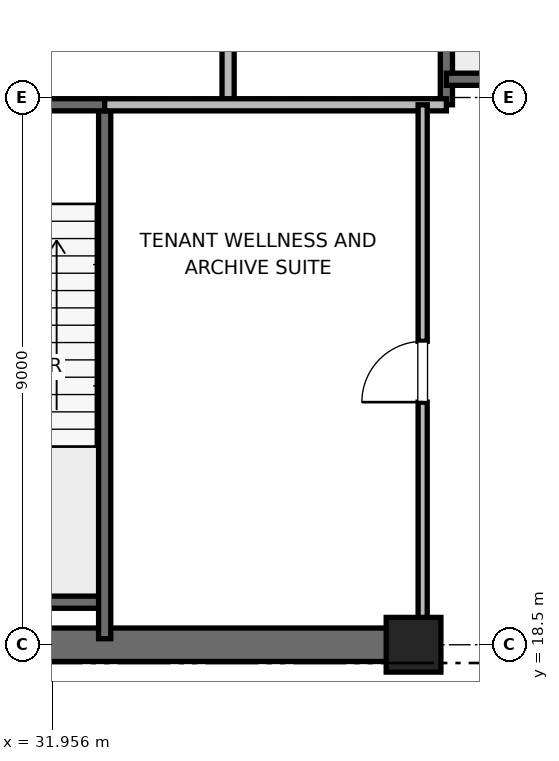
"""IFC4 building model, lengths in metres.
Left out: names, types, materials, properties, quantities, classifications, styles, units other than length and angle.
Written with IfcOpenShell. Run it as: python <this file> out.ifc"""

import sys

from ifc_helpers import new_model, si_unit, direction, frame, frame_2d, origin, origin_2d, place, context, subcontext, project, spatial, rectangle, extrude, element, fill, save


model = new_model("IFC4")
c1 = context("Model", 3, precision=1e-05, world=origin(), true_north=direction((0.0, 1.0)))
c2 = subcontext(c1, "Body", "Model", "MODEL_VIEW")
j1 = project(units=[si_unit("LENGTHUNIT", "METRE"), si_unit("PLANEANGLEUNIT", "RADIAN")], contexts=[c1])
p1 = place(None, origin())
s1 = spatial("IfcSite", under=j1, at=p1, CompositionType="ELEMENT")
p2 = place(p1, origin())
s2 = spatial("IfcBuilding", under=s1, at=p2, CompositionType="ELEMENT")
p3 = place(p2, frame((0.0, 0.0, 238.2)))
s3 = spatial("IfcBuildingStorey", under=s2, at=p3, CompositionType="ELEMENT", Elevation=238.2)
p4 = place(p3, frame((37.9, 18.5, 0.0), z_axis=(0.0, 0.0, 1.0), x_axis=(1.0, 0.0, 0.0)))
e1 = element("IfcColumn", 1, at=p4, inside=s3, PredefinedType="PILASTER", context=c2, shape_type="SweptSolid", body=[
    extrude(rectangle(XDim=0.9, YDim=0.9, at=origin_2d()), origin(), (0.0, 0.0, 1.0), 5.0),
])
p5 = place(p3, frame((29.0, 18.5, 0.0), z_axis=(0.0, 0.0, 1.0), x_axis=(1.0, 0.0, 0.0)))
e2 = element("IfcWall", 2, at=p5, inside=s3, PredefinedType="SHEAR", context=c2, shape_type="SweptSolid", body=[
    extrude(rectangle(XDim=9.2, YDim=0.55, at=frame_2d((4.6, 0.0))), origin(), (0.0, 0.0, 1.0), 4.785),
])
p6 = place(p3, frame((29.7, 19.2, 0.0), z_axis=(0.0, 0.0, 1.0), x_axis=(1.0, 0.0, 0.0)))
e3 = element("IfcWall", 3, at=p6, inside=s3, PredefinedType="SOLIDWALL", context=c2, shape_type="SweptSolid", body=[
    extrude(rectangle(XDim=3.12, YDim=0.2, at=frame_2d((1.56, 0.0))), origin(), (0.0, 0.0, 1.0), 4.785),
])
p7 = place(p3, frame((32.82, 18.6, 0.0), z_axis=(0.0, 0.0, 1.0), x_axis=(0.0, 1.0, 0.0)))
e4 = element("IfcWall", 4, at=p7, inside=s3, PredefinedType="SOLIDWALL", context=c2, shape_type="SweptSolid", body=[
    extrude(rectangle(XDim=8.78, YDim=0.2, at=frame_2d((4.39, 0.0))), origin(), (0.0, 0.0, 1.0), 4.785),
])
p8 = place(p3, frame((29.7, 27.38, 0.0), z_axis=(0.0, 0.0, 1.0), x_axis=(1.0, 0.0, 0.0)))
e5 = element("IfcWall", 5, at=p8, inside=s3, PredefinedType="SOLIDWALL", context=c2, shape_type="SweptSolid", body=[
    extrude(rectangle(XDim=3.12, YDim=0.2, at=frame_2d((1.56, 0.0))), origin(), (0.0, 0.0, 1.0), 4.785),
])
p9 = place(p8, frame((1.01, 0.0, 0.0)))
e6 = element("IfcOpeningElement", 6, at=p9, cuts=e5, PredefinedType="OPENING", context=c2, shape_type="SweptSolid", body=[
    extrude(rectangle(XDim=1.1, YDim=2.15, at=frame_2d((0.55, 1.075))), frame((0.0, 0.1, 0.0), z_axis=(0.0, -1.0, 0.0), x_axis=(1.0, 0.0, 0.0)), (0.0, 0.0, 1.0), 0.2),
])
p10 = place(p3, frame((38.44, 27.38, 0.0), z_axis=(0.0, 0.0, 1.0), x_axis=(0.0, 1.0, 0.0)))
e7 = element("IfcWall", 7, at=p10, inside=s3, PredefinedType="SOLIDWALL", context=c2, shape_type="SweptSolid", body=[
    extrude(rectangle(XDim=8.87, YDim=0.2, at=frame_2d((4.435, 0.0))), origin(), (0.0, 0.0, 1.0), 4.785),
])
p11 = place(p3, frame((38.44, 27.8, 0.0), z_axis=(0.0, 0.0, 1.0), x_axis=(1.0, 0.0, 0.0)))
e8 = element("IfcWall", 8, at=p11, inside=s3, PredefinedType="SOLIDWALL", context=c2, shape_type="SweptSolid", body=[
    extrude(rectangle(XDim=3.32, YDim=0.2, at=frame_2d((1.66, 0.0))), origin(), (0.0, 0.0, 1.0), 4.785),
])
p12 = place(p3, frame((34.85, 27.38, 0.0), z_axis=(0.0, 0.0, 1.0), x_axis=(0.0, 1.0, 0.0)))
e9 = element("IfcWall", 9, at=p12, inside=s3, PredefinedType="PARTITIONING", context=c2, shape_type="SweptSolid", body=[
    extrude(rectangle(XDim=3.37, YDim=0.2, at=frame_2d((1.685, 0.0))), origin(), (0.0, 0.0, 1.0), 4.785),
])
p13 = place(p12, frame((1.11, 0.0, 0.0)))
e10 = element("IfcOpeningElement", 10, at=p13, cuts=e9, PredefinedType="OPENING", context=c2, shape_type="SweptSolid", body=[
    extrude(rectangle(XDim=1.15, YDim=2.2, at=frame_2d((0.575, 1.1))), frame((0.0, 0.1, 0.0), z_axis=(0.0, -1.0, 0.0), x_axis=(1.0, 0.0, 0.0)), (0.0, 0.0, 1.0), 0.2),
])
p14 = place(p3, frame((32.82, 27.38, 0.0), z_axis=(0.0, 0.0, 1.0), x_axis=(1.0, 0.0, 0.0)))
e11 = element("IfcWall", 11, at=p14, inside=s3, PredefinedType="PARTITIONING", context=c2, shape_type="SweptSolid", body=[
    extrude(rectangle(XDim=5.62, YDim=0.2, at=frame_2d((2.81, 0.0))), origin(), (0.0, 0.0, 1.0), 4.785),
])
p15 = place(p3, frame((38.05, 18.6, 0.0), z_axis=(0.0, 0.0, 1.0), x_axis=(0.0, 1.0, 0.0)))
e12 = element("IfcWall", 12, at=p15, inside=s3, PredefinedType="PARTITIONING", context=c2, shape_type="SweptSolid", body=[
    extrude(rectangle(XDim=8.78, YDim=0.15, at=frame_2d((4.39, 0.0))), origin(), (0.0, 0.0, 1.0), 2.85),
])
p16 = place(p15, frame((3.89, 0.0, 0.0)))
e13 = element("IfcOpeningElement", 13, at=p16, cuts=e12, PredefinedType="OPENING", context=c2, shape_type="SweptSolid", body=[
    extrude(rectangle(XDim=1.0, YDim=2.15, at=frame_2d((0.5, 1.075))), frame((0.0, 0.075, 0.0), z_axis=(0.0, -1.0, 0.0), x_axis=(1.0, 0.0, 0.0)), (0.0, 0.0, 1.0), 0.15),
])
p17 = place(p16, origin())
e14 = element("IfcDoor", 14, at=p17, inside=s3, OperationType="SINGLE_SWING_LEFT", PredefinedType="DOOR", context=c2, shape_type="SweptSolid", body=[
    extrude(rectangle(XDim=1.0, YDim=2.15, at=frame_2d((0.5, 1.075))), frame((0.0, 0.025, 0.0), z_axis=(0.0, -1.0, 0.0), x_axis=(1.0, 0.0, 0.0)), (0.0, 0.0, 1.0), 0.05),
])
fill(e13, e14)
save(model, sys.argv[1])
